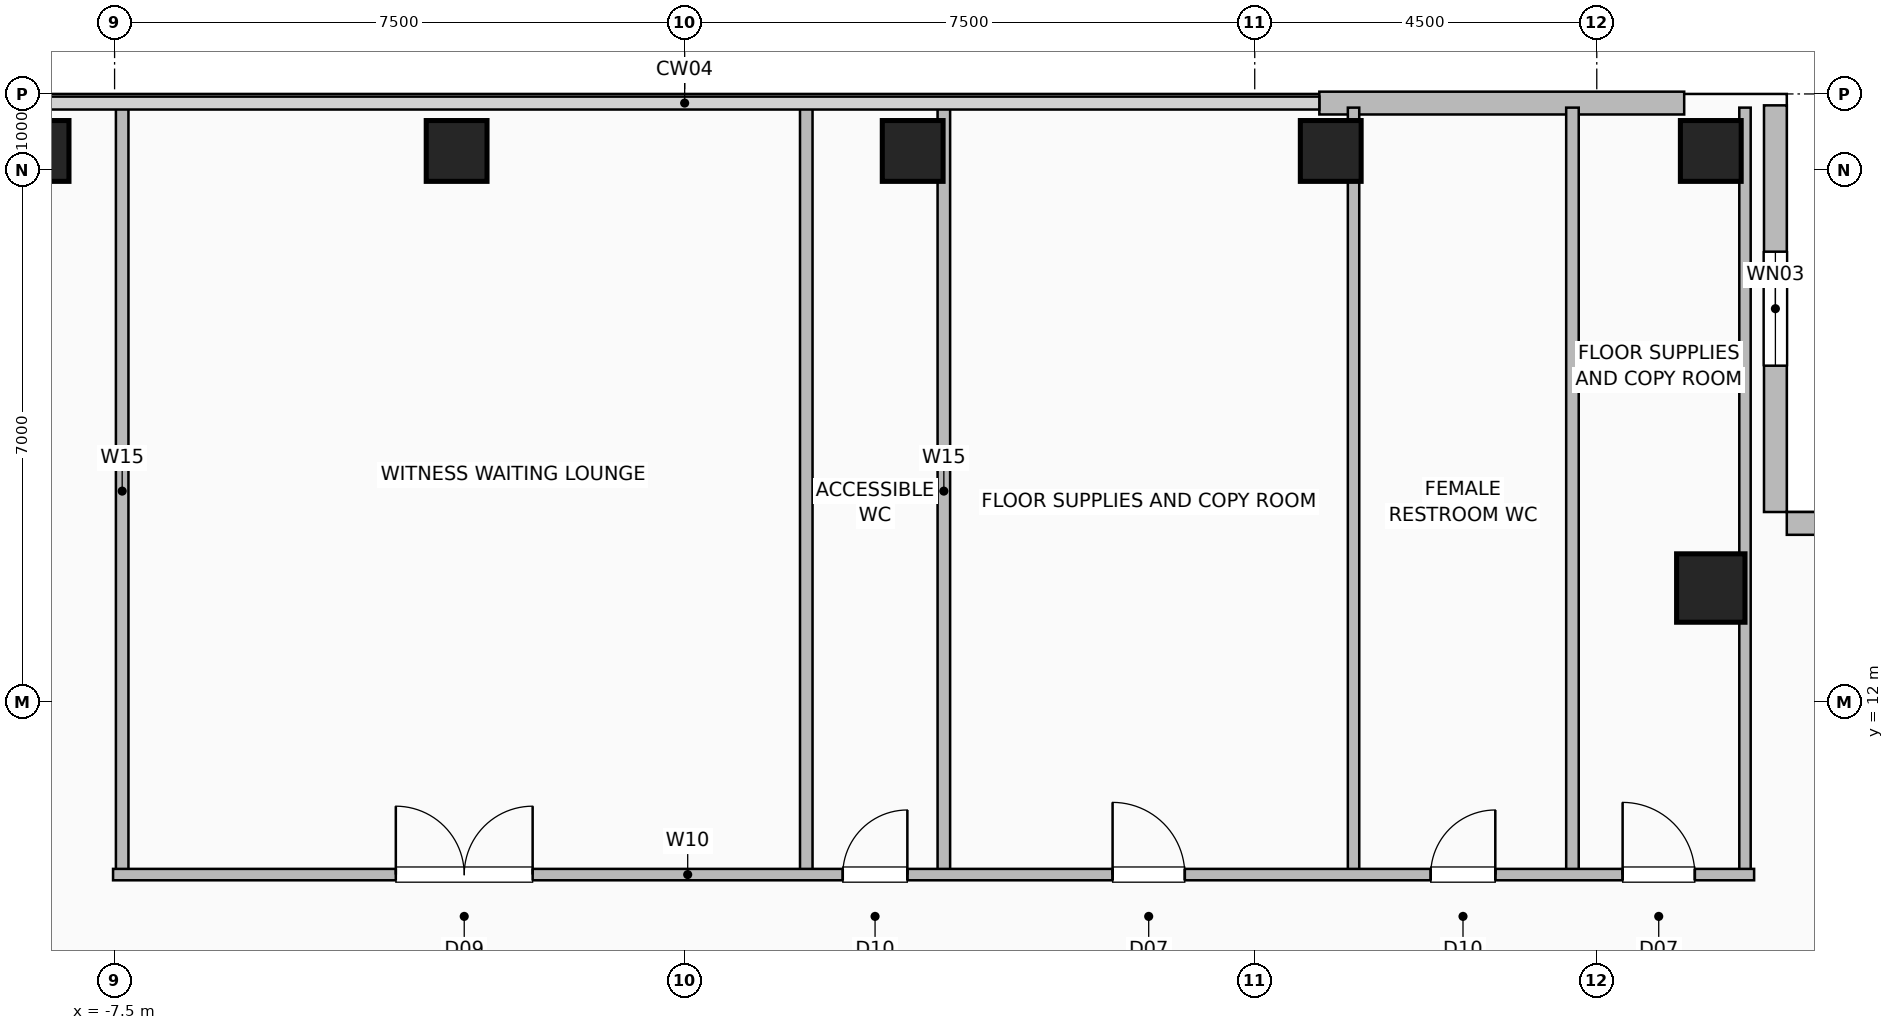
"""IFC4 building model, lengths in metres.
Left out: names, types, materials, properties, quantities, classifications, styles, units other than length and angle.
Written with IfcOpenShell. Run it as: python <this file> out.ifc"""

import sys

from ifc_helpers import new_model, si_unit, direction, frame, frame_2d, origin, origin_2d, place, context, subcontext, project, spatial, rectangle, hollow_rectangle, extrude, element, fill, save


model = new_model("IFC4")
c1 = context("Model", 3, precision=1e-05, world=origin(), true_north=direction((0.0, 1.0)))
c2 = subcontext(c1, "Body", "Model", "MODEL_VIEW")
j1 = project(units=[si_unit("LENGTHUNIT", "METRE"), si_unit("PLANEANGLEUNIT", "RADIAN")], contexts=[c1])
p1 = place(None, origin())
s1 = spatial("IfcSite", under=j1, at=p1, CompositionType="ELEMENT")
p2 = place(p1, origin())
s2 = spatial("IfcBuilding", under=s1, at=p2, CompositionType="ELEMENT")
p3 = place(p2, frame((0.0, 0.0, 180.6)))
s3 = spatial("IfcBuildingStorey", under=s2, at=p3, CompositionType="ELEMENT", Elevation=180.6)
for number, where, z_axis, x_axis in (
    (1, (-8.5, 19.25, 0.0), (0.0, 0.0, 1.0), (1.0, 0.0, 0.0)),
    (2, (-3.0, 19.25, 0.0), (0.0, 0.0, 1.0), (1.0, 0.0, 0.0)),
    (3, (3.0, 19.25, 0.0), (0.0, 0.0, 1.0), (1.0, 0.0, 0.0)),
    (4, (8.5, 19.25, 0.0), (0.0, 0.0, 1.0), (1.0, 0.0, 0.0)),
    (5, (13.5, 19.25, 0.0), (0.0, 0.0, 1.0), (1.0, 0.0, 0.0)),
):
    element("IfcColumn", number, at=place(p3, frame(where, z_axis=z_axis, x_axis=x_axis)), inside=s3, PredefinedType="COLUMN", context=c2, shape_type="SweptSolid", body=[
        extrude(hollow_rectangle(XDim=0.8, YDim=0.8, WallThickness=0.04, at=origin_2d()), origin(), (0.0, 0.0, 1.0), 3.6),
    ])
p4 = place(p3, frame((13.5, 13.5, 0.0), z_axis=(0.0, 0.0, 1.0), x_axis=(1.0, 0.0, 0.0)))
e6 = element("IfcColumn", 6, at=p4, inside=s3, PredefinedType="COLUMN", context=c2, shape_type="SweptSolid", body=[
    extrude(hollow_rectangle(XDim=0.9, YDim=0.9, WallThickness=0.045, at=origin_2d()), origin(), (0.0, 0.0, 1.0), 3.6),
])
p5 = place(p3, frame((8.35, 19.88, 0.0), z_axis=(0.0, 0.0, 1.0), x_axis=(1.0, 0.0, 0.0)))
e7 = element("IfcWall", 7, at=p5, inside=s3, PredefinedType="SOLIDWALL", context=c2, shape_type="SweptSolid", body=[
    extrude(rectangle(XDim=4.8, YDim=0.3, at=frame_2d((2.4, 0.0))), origin(), (0.0, 0.0, 1.0), 3.36),
])
p6 = place(p3, frame((14.35, 19.85, 0.0), z_axis=(0.0, 0.0, 1.0), x_axis=(0.0, -1.0, 0.0)))
e8 = element("IfcWall", 8, at=p6, inside=s3, PredefinedType="SOLIDWALL", context=c2, shape_type="SweptSolid", body=[
    extrude(rectangle(XDim=5.35, YDim=0.3, at=frame_2d((2.675, 0.0))), origin(), (0.0, 0.0, 1.0), 3.36),
])
p7 = place(p6, frame((1.925, 0.0, 0.9)))
e9 = element("IfcOpeningElement", 9, at=p7, cuts=e8, PredefinedType="OPENING", context=c2, shape_type="SweptSolid", body=[
    extrude(rectangle(XDim=1.5, YDim=1.8, at=frame_2d((0.75, 0.9))), frame((0.0, 0.16, 0.0), z_axis=(0.0, -1.0, 0.0), x_axis=(1.0, 0.0, 0.0)), (0.0, 0.0, 1.0), 0.32),
])
p8 = place(p3, frame((19.85, 14.35, 0.0), z_axis=(0.0, 0.0, 1.0), x_axis=(-1.0, 0.0, 0.0)))
e10 = element("IfcWall", 10, at=p8, inside=s3, PredefinedType="SOLIDWALL", context=c2, shape_type="SweptSolid", body=[
    extrude(rectangle(XDim=5.35, YDim=0.3, at=frame_2d((2.675, 0.0))), origin(), (0.0, 0.0, 1.0), 3.36),
])
for number, where, z_axis, x_axis in (
    (11, (3.41, 9.73, 0.0), (0.0, 0.0, 1.0), (0.0, 1.0, 0.0)),
    (12, (11.68, 9.73, 0.0), (0.0, 0.0, 1.0), (0.0, 1.0, 0.0)),
    (13, (-7.4, 9.73, 0.0), (0.0, 0.0, 1.0), (0.0, 1.0, 0.0)),
    (14, (1.6, 9.73, 0.0), (0.0, 0.0, 1.0), (0.0, 1.0, 0.0)),
):
    element("IfcWall", number, at=place(p3, frame(where, z_axis=z_axis, x_axis=x_axis)), inside=s3, PredefinedType="PLUMBINGWALL", context=c2, shape_type="SweptSolid", body=[
        extrude(rectangle(XDim=10.09, YDim=0.165, at=frame_2d((5.045, 0.0))), origin(), (0.0, 0.0, 1.0), 3.36),
    ])
for number, where, z_axis, x_axis in (
    (15, (8.8, 9.73, 0.0), (0.0, 0.0, 1.0), (0.0, 1.0, 0.0)),
    (16, (13.95, 9.73, 0.0), (0.0, 0.0, 1.0), (0.0, 1.0, 0.0)),
):
    element("IfcWall", number, at=place(p3, frame(where, z_axis=z_axis, x_axis=x_axis)), inside=s3, PredefinedType="PARTITIONING", context=c2, shape_type="SweptSolid", body=[
        extrude(rectangle(XDim=10.09, YDim=0.15, at=frame_2d((5.045, 0.0))), origin(), (0.0, 0.0, 1.0), 3.36),
    ])
p9 = place(p3, frame((-7.52, 9.73, 0.0), z_axis=(0.0, 0.0, 1.0), x_axis=(1.0, 0.0, 0.0)))
e17 = element("IfcWall", 17, at=p9, inside=s3, PredefinedType="PARTITIONING", context=c2, shape_type="SweptSolid", body=[
    extrude(rectangle(XDim=21.59, YDim=0.15, at=frame_2d((10.795, 0.0))), origin(), (0.0, 0.0, 1.0), 3.36),
])
p10 = place(p9, frame((3.72, 0.0, 0.0)))
e18 = element("IfcOpeningElement", 18, at=p10, cuts=e17, PredefinedType="OPENING", context=c2, shape_type="SweptSolid", body=[
    extrude(rectangle(XDim=1.8, YDim=2.08, at=frame_2d((0.9, 1.04))), frame((0.0, 0.085, 0.0), z_axis=(0.0, -1.0, 0.0), x_axis=(1.0, 0.0, 0.0)), (0.0, 0.0, 1.0), 0.17),
])
p11 = place(p9, frame((9.6, 0.0, 0.0)))
e19 = element("IfcOpeningElement", 19, at=p11, cuts=e17, PredefinedType="OPENING", context=c2, shape_type="SweptSolid", body=[
    extrude(rectangle(XDim=0.85, YDim=2.05, at=frame_2d((0.425, 1.025))), frame((0.0, 0.085, 0.0), z_axis=(0.0, -1.0, 0.0), x_axis=(1.0, 0.0, 0.0)), (0.0, 0.0, 1.0), 0.17),
])
p12 = place(p9, frame((13.15, 0.0, 0.0)))
e20 = element("IfcOpeningElement", 20, at=p12, cuts=e17, PredefinedType="OPENING", context=c2, shape_type="SweptSolid", body=[
    extrude(rectangle(XDim=0.95, YDim=2.06, at=frame_2d((0.475, 1.03))), frame((0.0, 0.085, 0.0), z_axis=(0.0, -1.0, 0.0), x_axis=(1.0, 0.0, 0.0)), (0.0, 0.0, 1.0), 0.17),
])
p13 = place(p9, frame((17.335, 0.0, 0.0)))
e21 = element("IfcOpeningElement", 21, at=p13, cuts=e17, PredefinedType="OPENING", context=c2, shape_type="SweptSolid", body=[
    extrude(rectangle(XDim=0.85, YDim=2.05, at=frame_2d((0.425, 1.025))), frame((0.0, 0.085, 0.0), z_axis=(0.0, -1.0, 0.0), x_axis=(1.0, 0.0, 0.0)), (0.0, 0.0, 1.0), 0.17),
])
p14 = place(p9, frame((19.86, 0.0, 0.0)))
e22 = element("IfcOpeningElement", 22, at=p14, cuts=e17, PredefinedType="OPENING", context=c2, shape_type="SweptSolid", body=[
    extrude(rectangle(XDim=0.95, YDim=2.06, at=frame_2d((0.475, 1.03))), frame((0.0, 0.085, 0.0), z_axis=(0.0, -1.0, 0.0), x_axis=(1.0, 0.0, 0.0)), (0.0, 0.0, 1.0), 0.17),
])
p15 = place(p7, origin())
e23 = element("IfcWindow", 23, at=p15, inside=s3, PartitioningType="SINGLE_PANEL", PredefinedType="WINDOW", context=c2, shape_type="SweptSolid", body=[
    extrude(rectangle(XDim=1.5, YDim=1.8, at=frame_2d((0.75, 0.9))), frame((0.0, 0.03, 0.0), z_axis=(0.0, -1.0, 0.0), x_axis=(1.0, 0.0, 0.0)), (0.0, 0.0, 1.0), 0.06),
])
fill(e9, e23)
p16 = place(p10, origin())
e24 = element("IfcDoor", 24, at=p16, inside=s3, OperationType="DOUBLE_DOOR_SINGLE_SWING", PredefinedType="DOOR", context=c2, shape_type="SweptSolid", body=[
    extrude(rectangle(XDim=1.8, YDim=2.08, at=frame_2d((0.9, 1.04))), frame((0.0, 0.025, 0.0), z_axis=(0.0, -1.0, 0.0), x_axis=(1.0, 0.0, 0.0)), (0.0, 0.0, 1.0), 0.05),
])
fill(e18, e24)
p17 = place(p11, origin())
e25 = element("IfcDoor", 25, at=p17, inside=s3, OperationType="SINGLE_SWING_RIGHT", PredefinedType="DOOR", context=c2, shape_type="SweptSolid", body=[
    extrude(rectangle(XDim=0.85, YDim=2.05, at=frame_2d((0.425, 1.025))), frame((0.0, 0.025, 0.0), z_axis=(0.0, -1.0, 0.0), x_axis=(1.0, 0.0, 0.0)), (0.0, 0.0, 1.0), 0.05),
])
fill(e19, e25)
p18 = place(p12, origin())
e26 = element("IfcDoor", 26, at=p18, inside=s3, OperationType="SINGLE_SWING_LEFT", PredefinedType="DOOR", context=c2, shape_type="SweptSolid", body=[
    extrude(rectangle(XDim=0.95, YDim=2.06, at=frame_2d((0.475, 1.03))), frame((0.0, 0.025, 0.0), z_axis=(0.0, -1.0, 0.0), x_axis=(1.0, 0.0, 0.0)), (0.0, 0.0, 1.0), 0.05),
])
fill(e20, e26)
p19 = place(p13, origin())
e27 = element("IfcDoor", 27, at=p19, inside=s3, OperationType="SINGLE_SWING_RIGHT", PredefinedType="DOOR", context=c2, shape_type="SweptSolid", body=[
    extrude(rectangle(XDim=0.85, YDim=2.05, at=frame_2d((0.425, 1.025))), frame((0.0, 0.025, 0.0), z_axis=(0.0, -1.0, 0.0), x_axis=(1.0, 0.0, 0.0)), (0.0, 0.0, 1.0), 0.05),
])
fill(e21, e27)
p20 = place(p14, origin())
e28 = element("IfcDoor", 28, at=p20, inside=s3, OperationType="SINGLE_SWING_LEFT", PredefinedType="DOOR", context=c2, shape_type="SweptSolid", body=[
    extrude(rectangle(XDim=0.95, YDim=2.06, at=frame_2d((0.475, 1.03))), frame((0.0, 0.025, 0.0), z_axis=(0.0, -1.0, 0.0), x_axis=(1.0, 0.0, 0.0)), (0.0, 0.0, 1.0), 0.05),
])
fill(e22, e28)
save(model, sys.argv[1])
